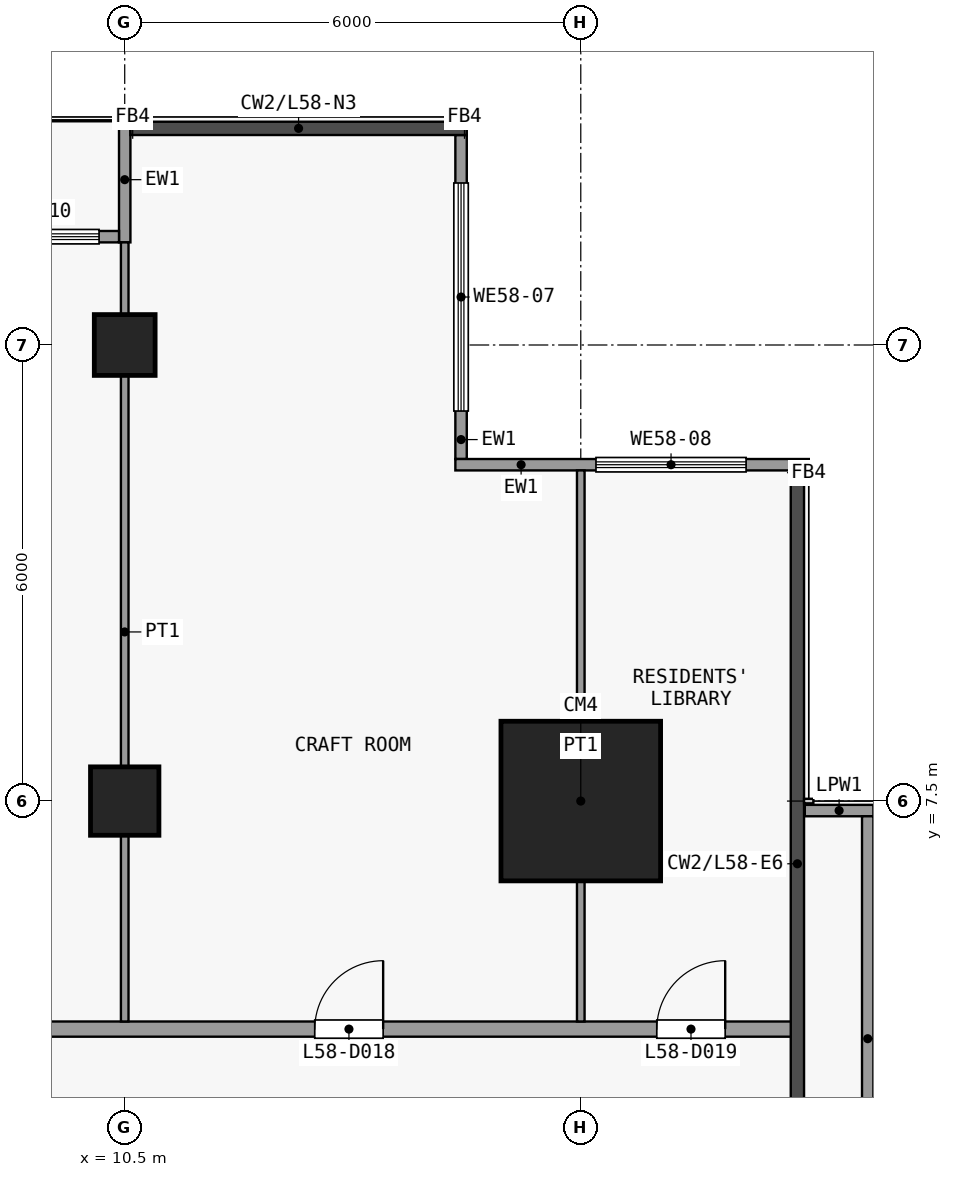
"""IFC4 building model, lengths in metres.
Left out: names, types, materials, properties, quantities, classifications, styles, units other than length and angle.
Written with IfcOpenShell. Run it as: python <this file> out.ifc"""

import sys

from ifc_helpers import new_model, si_unit, direction, frame, frame_2d, origin, origin_2d, place, context, subcontext, project, spatial, rectangle, extrude, element, fill, save


model = new_model("IFC4")
c1 = context("Model", 3, precision=1e-05, world=origin(), true_north=direction((0.0, 1.0)))
c2 = subcontext(c1, "Body", "Model", "MODEL_VIEW")
j1 = project(units=[si_unit("LENGTHUNIT", "METRE"), si_unit("PLANEANGLEUNIT", "RADIAN")], contexts=[c1])
p1 = place(None, origin())
s1 = spatial("IfcSite", under=j1, at=p1, CompositionType="ELEMENT")
p2 = place(p1, origin())
s2 = spatial("IfcBuilding", under=s1, at=p2, CompositionType="ELEMENT")
p3 = place(p2, frame((0.0, 0.0, 230.3)))
s3 = spatial("IfcBuildingStorey", under=s2, at=p3, CompositionType="ELEMENT", Elevation=230.3)
p4 = place(p3, frame((10.5, 7.5, 0.0), z_axis=(0.0, 0.0, 1.0), x_axis=(1.0, 0.0, 0.0)))
e1 = element("IfcColumn", 1, at=p4, inside=s3, PredefinedType="COLUMN", context=c2, shape_type="SweptSolid", body=[
    extrude(rectangle(XDim=0.9, YDim=0.9, at=origin_2d()), origin(), (0.0, 0.0, 1.0), 3.6),
])
p5 = place(p3, frame((10.5, 13.5, 0.0), z_axis=(0.0, 0.0, 1.0), x_axis=(1.0, 0.0, 0.0)))
e2 = element("IfcColumn", 2, at=p5, inside=s3, PredefinedType="COLUMN", context=c2, shape_type="SweptSolid", body=[
    extrude(rectangle(XDim=0.8, YDim=0.8, at=origin_2d()), origin(), (0.0, 0.0, 1.0), 3.6),
])
p6 = place(p3, frame((16.5, 7.5, 0.0), z_axis=(0.0, 0.0, 1.0), x_axis=(1.0, 0.0, 0.0)))
e3 = element("IfcColumn", 3, at=p6, inside=s3, PredefinedType="COLUMN", context=c2, shape_type="SweptSolid", body=[
    extrude(rectangle(XDim=2.1, YDim=2.1, at=origin_2d()), origin(), (0.0, 0.0, 1.0), 3.6),
])
p7 = place(p3, frame((14.925, 16.262, 0.0), z_axis=(0.0, 0.0, 1.0), x_axis=(0.0, -1.0, 0.0)))
e4 = element("IfcWall", 4, at=p7, inside=s3, PredefinedType="SOLIDWALL", context=c2, shape_type="SweptSolid", body=[
    extrude(rectangle(XDim=4.262, YDim=0.15, at=frame_2d((2.131, 0.0))), origin(), (0.0, 0.0, 1.0), 3.3),
])
p8 = place(p7, frame((0.631, 0.0, 0.9)))
e5 = element("IfcOpeningElement", 5, at=p8, cuts=e4, PredefinedType="OPENING", context=c2, shape_type="SweptSolid", body=[
    extrude(rectangle(XDim=3.0, YDim=2.4, at=frame_2d((1.5, 1.2))), frame((0.0, 0.085, 0.0), z_axis=(0.0, -1.0, 0.0), x_axis=(1.0, 0.0, 0.0)), (0.0, 0.0, 1.0), 0.17),
])
p9 = place(p3, frame((14.85, 11.925, 0.0), z_axis=(0.0, 0.0, 1.0), x_axis=(1.0, 0.0, 0.0)))
e6 = element("IfcWall", 6, at=p9, inside=s3, PredefinedType="SOLIDWALL", context=c2, shape_type="SweptSolid", body=[
    extrude(rectangle(XDim=4.65, YDim=0.15, at=frame_2d((2.325, 0.0))), origin(), (0.0, 0.0, 1.0), 3.3),
])
p10 = place(p9, frame((1.85, 0.0, 0.9)))
e7 = element("IfcOpeningElement", 7, at=p10, cuts=e6, PredefinedType="OPENING", context=c2, shape_type="SweptSolid", body=[
    extrude(rectangle(XDim=1.975, YDim=2.4, at=frame_2d((0.988, 1.2))), frame((0.0, 0.085, 0.0), z_axis=(0.0, -1.0, 0.0), x_axis=(1.0, 0.0, 0.0)), (0.0, 0.0, 1.0), 0.17),
])
p11 = place(p3, frame((10.5, 14.85, 0.0), z_axis=(0.0, 0.0, 1.0), x_axis=(0.0, 1.0, 0.0)))
e8 = element("IfcWall", 8, at=p11, inside=s3, PredefinedType="SOLIDWALL", context=c2, shape_type="SweptSolid", body=[
    extrude(rectangle(XDim=1.65, YDim=0.15, at=frame_2d((0.825, 0.0))), origin(), (0.0, 0.0, 1.0), 3.3),
])
p12 = place(p3, frame((4.575, 14.925, 0.0), z_axis=(0.0, 0.0, 1.0), x_axis=(1.0, 0.0, 0.0)))
e9 = element("IfcWall", 9, at=p12, inside=s3, PredefinedType="SOLIDWALL", context=c2, shape_type="SweptSolid", body=[
    extrude(rectangle(XDim=5.85, YDim=0.15, at=frame_2d((2.925, 0.0))), origin(), (0.0, 0.0, 1.0), 3.3),
])
p13 = place(p12, frame((2.325, 0.0, 0.0)))
e10 = element("IfcOpeningElement", 10, at=p13, cuts=e9, PredefinedType="OPENING", context=c2, shape_type="SweptSolid", body=[
    extrude(rectangle(XDim=1.2, YDim=2.4, at=frame_2d((0.6, 1.2))), frame((0.0, 0.085, 0.0), z_axis=(0.0, -1.0, 0.0), x_axis=(1.0, 0.0, 0.0)), (0.0, 0.0, 1.0), 0.17),
])
p14 = place(p12, frame((0.262, 0.0, 0.9)))
e11 = element("IfcOpeningElement", 11, at=p14, cuts=e9, PredefinedType="OPENING", context=c2, shape_type="SweptSolid", body=[
    extrude(rectangle(XDim=1.8, YDim=2.1, at=frame_2d((0.9, 1.05))), frame((0.0, 0.085, 0.0), z_axis=(0.0, -1.0, 0.0), x_axis=(1.0, 0.0, 0.0)), (0.0, 0.0, 1.0), 0.17),
])
p15 = place(p12, frame((3.788, 0.0, 0.9)))
e12 = element("IfcOpeningElement", 12, at=p15, cuts=e9, PredefinedType="OPENING", context=c2, shape_type="SweptSolid", body=[
    extrude(rectangle(XDim=1.8, YDim=2.1, at=frame_2d((0.9, 1.05))), frame((0.0, 0.085, 0.0), z_axis=(0.0, -1.0, 0.0), x_axis=(1.0, 0.0, 0.0)), (0.0, 0.0, 1.0), 0.17),
])
p16 = place(p3, frame((19.448, 7.375, 0.0), z_axis=(0.0, 0.0, 1.0), x_axis=(1.0, 0.0, 0.0)))
e13 = element("IfcWall", 13, at=p16, inside=s3, PredefinedType="PARAPET", context=c2, shape_type="SweptSolid", body=[
    extrude(rectangle(XDim=0.903, YDim=0.15, at=frame_2d((0.451, 0.0))), origin(), (0.0, 0.0, 1.0), 1.15),
])
p17 = place(p3, frame((20.275, 7.3, 0.0), z_axis=(0.0, 0.0, 1.0), x_axis=(0.0, -1.0, 0.0)))
e14 = element("IfcWall", 14, at=p17, inside=s3, PredefinedType="PARAPET", context=c2, shape_type="SweptSolid", body=[
    extrude(rectangle(XDim=5.853, YDim=0.15, at=frame_2d((2.926, 0.0))), origin(), (0.0, 0.0, 1.0), 1.15),
])
p18 = place(p3, frame((-20.25, 4.5, 0.0), z_axis=(0.0, 0.0, 1.0), x_axis=(1.0, 0.0, 0.0)))
e15 = element("IfcWall", 15, at=p18, inside=s3, PredefinedType="PARTITIONING", context=c2, shape_type="SweptSolid", body=[
    extrude(rectangle(XDim=39.6, YDim=0.2, at=frame_2d((19.8, 0.0))), origin(), (0.0, 0.0, 1.0), 3.3),
])
p19 = place(p18, frame((13.95, 0.0, 0.0)))
e16 = element("IfcOpeningElement", 16, at=p19, cuts=e15, PredefinedType="OPENING", context=c2, shape_type="SweptSolid", body=[
    extrude(rectangle(XDim=1.0, YDim=2.1, at=frame_2d((0.5, 1.05))), frame((0.0, 0.11, 0.0), z_axis=(0.0, -1.0, 0.0), x_axis=(1.0, 0.0, 0.0)), (0.0, 0.0, 1.0), 0.22),
])
p20 = place(p18, frame((27.25, 0.0, 0.0)))
e17 = element("IfcOpeningElement", 17, at=p20, cuts=e15, PredefinedType="OPENING", context=c2, shape_type="SweptSolid", body=[
    extrude(rectangle(XDim=0.9, YDim=2.1, at=frame_2d((0.45, 1.05))), frame((0.0, 0.11, 0.0), z_axis=(0.0, -1.0, 0.0), x_axis=(1.0, 0.0, 0.0)), (0.0, 0.0, 1.0), 0.22),
])
p21 = place(p18, frame((33.25, 0.0, 0.0)))
e18 = element("IfcOpeningElement", 18, at=p21, cuts=e15, PredefinedType="OPENING", context=c2, shape_type="SweptSolid", body=[
    extrude(rectangle(XDim=0.9, YDim=2.1, at=frame_2d((0.45, 1.05))), frame((0.0, 0.11, 0.0), z_axis=(0.0, -1.0, 0.0), x_axis=(1.0, 0.0, 0.0)), (0.0, 0.0, 1.0), 0.22),
])
p22 = place(p18, frame((37.75, 0.0, 0.0)))
e19 = element("IfcOpeningElement", 19, at=p22, cuts=e15, PredefinedType="OPENING", context=c2, shape_type="SweptSolid", body=[
    extrude(rectangle(XDim=0.9, YDim=2.1, at=frame_2d((0.45, 1.05))), frame((0.0, 0.11, 0.0), z_axis=(0.0, -1.0, 0.0), x_axis=(1.0, 0.0, 0.0)), (0.0, 0.0, 1.0), 0.22),
])
p23 = place(p3, frame((10.5, 4.6, 0.0), z_axis=(0.0, 0.0, 1.0), x_axis=(0.0, 1.0, 0.0)))
e20 = element("IfcWall", 20, at=p23, inside=s3, PredefinedType="PARTITIONING", context=c2, shape_type="SweptSolid", body=[
    extrude(rectangle(XDim=10.25, YDim=0.1, at=frame_2d((5.125, 0.0))), origin(), (0.0, 0.0, 1.0), 3.3),
])
p24 = place(p3, frame((16.5, 4.6, 0.0), z_axis=(0.0, 0.0, 1.0), x_axis=(0.0, 1.0, 0.0)))
e21 = element("IfcWall", 21, at=p24, inside=s3, PredefinedType="PARTITIONING", context=c2, shape_type="SweptSolid", body=[
    extrude(rectangle(XDim=7.25, YDim=0.1, at=frame_2d((3.625, 0.0))), origin(), (0.0, 0.0, 1.0), 3.3),
])
p25 = place(p8, origin())
e22 = element("IfcWindow", 22, at=p25, inside=s3, PartitioningType="SINGLE_PANEL", PredefinedType="WINDOW", context=c2, shape_type="SweptSolid", body=[
    extrude(rectangle(XDim=3.0, YDim=2.4, at=frame_2d((1.5, 1.2))), frame((0.0, 0.03, 0.0), z_axis=(0.0, -1.0, 0.0), x_axis=(1.0, 0.0, 0.0)), (0.0, 0.0, 1.0), 0.06),
])
fill(e5, e22)
p26 = place(p10, origin())
e23 = element("IfcWindow", 23, at=p26, inside=s3, PartitioningType="SINGLE_PANEL", PredefinedType="WINDOW", context=c2, shape_type="SweptSolid", body=[
    extrude(rectangle(XDim=1.975, YDim=2.4, at=frame_2d((0.988, 1.2))), frame((0.0, 0.03, 0.0), z_axis=(0.0, -1.0, 0.0), x_axis=(1.0, 0.0, 0.0)), (0.0, 0.0, 1.0), 0.06),
])
fill(e7, e23)
p27 = place(p15, origin())
e24 = element("IfcWindow", 24, at=p27, inside=s3, PartitioningType="SINGLE_PANEL", PredefinedType="WINDOW", context=c2, shape_type="SweptSolid", body=[
    extrude(rectangle(XDim=1.8, YDim=2.1, at=frame_2d((0.9, 1.05))), frame((0.0, 0.03, 0.0), z_axis=(0.0, -1.0, 0.0), x_axis=(1.0, 0.0, 0.0)), (0.0, 0.0, 1.0), 0.06),
])
fill(e12, e24)
p28 = place(p21, origin())
e25 = element("IfcDoor", 25, at=p28, inside=s3, OperationType="SINGLE_SWING_LEFT", PredefinedType="DOOR", context=c2, shape_type="SweptSolid", body=[
    extrude(rectangle(XDim=0.9, YDim=2.1, at=frame_2d((0.45, 1.05))), frame((0.0, 0.025, 0.0), z_axis=(0.0, -1.0, 0.0), x_axis=(1.0, 0.0, 0.0)), (0.0, 0.0, 1.0), 0.05),
])
fill(e18, e25)
p29 = place(p22, origin())
e26 = element("IfcDoor", 26, at=p29, inside=s3, OperationType="SINGLE_SWING_LEFT", PredefinedType="DOOR", context=c2, shape_type="SweptSolid", body=[
    extrude(rectangle(XDim=0.9, YDim=2.1, at=frame_2d((0.45, 1.05))), frame((0.0, 0.025, 0.0), z_axis=(0.0, -1.0, 0.0), x_axis=(1.0, 0.0, 0.0)), (0.0, 0.0, 1.0), 0.05),
])
fill(e19, e26)
save(model, sys.argv[1])
